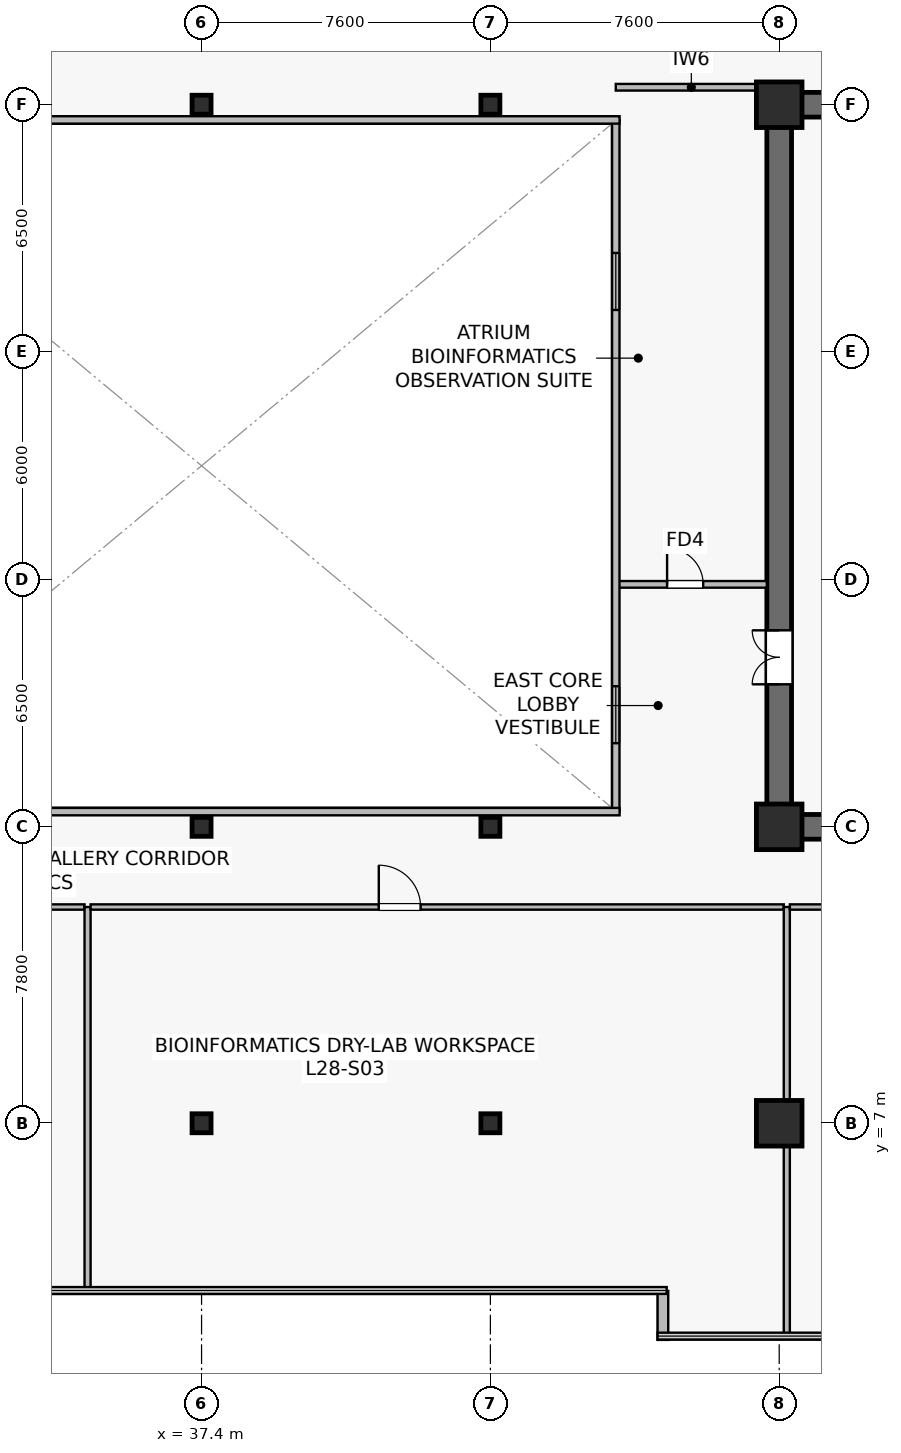
"""IFC4 building model, lengths in metres.
Left out: names, types, materials, properties, quantities, classifications, styles, units other than length and angle.
Written with IfcOpenShell. Run it as: python <this file> out.ifc"""

import sys

from ifc_helpers import new_model, si_unit, direction, frame, frame_2d, origin, origin_2d, place, context, subcontext, project, spatial, rectangle, hollow_rectangle, extrude, source, transform, mapped, element, fill, save


model = new_model("IFC4")
c1 = context("Model", 3, precision=1e-05, world=origin(), true_north=direction((0.0, 1.0)))
c2 = subcontext(c1, "Body", "Model", "MODEL_VIEW")
j1 = project(units=[si_unit("LENGTHUNIT", "METRE"), si_unit("PLANEANGLEUNIT", "RADIAN")], contexts=[c1])
p1 = place(None, origin())
s1 = spatial("IfcSite", under=j1, at=p1, CompositionType="ELEMENT")
p2 = place(p1, origin())
s2 = spatial("IfcBuilding", under=s1, at=p2, CompositionType="ELEMENT")
p3 = place(p2, frame((0.0, 0.0, 117.4)))
s3 = spatial("IfcBuildingStorey", under=s2, at=p3, CompositionType="ELEMENT", Elevation=117.4)
p4 = place(p3, frame((52.275, 14.8, 0.0), z_axis=(0.0, 0.0, 1.0), x_axis=(1.0, 0.0, 0.0)))
e1 = element("IfcWall", 1, at=p4, inside=s3, PredefinedType="SHEAR", context=c2, shape_type="SweptSolid", body=[
    extrude(rectangle(XDim=15.45, YDim=0.65, at=frame_2d((7.725, 0.0))), origin(), (0.0, 0.0, 1.0), 3.79),
])
p5 = place(p3, frame((52.275, 33.8, 0.0), z_axis=(0.0, 0.0, 1.0), x_axis=(1.0, 0.0, 0.0)))
e2 = element("IfcWall", 2, at=p5, inside=s3, PredefinedType="SHEAR", context=c2, shape_type="SweptSolid", body=[
    extrude(rectangle(XDim=15.45, YDim=0.65, at=frame_2d((7.725, 0.0))), origin(), (0.0, 0.0, 1.0), 3.79),
])
p6 = place(p5, frame((8.825, 0.0, 0.0)))
e3 = element("IfcOpeningElement", 3, at=p6, cuts=e2, PredefinedType="OPENING", context=c2, shape_type="SweptSolid", body=[
    extrude(rectangle(XDim=0.95, YDim=2.15, at=frame_2d((0.475, 1.075))), frame((0.0, 0.335, 0.0), z_axis=(0.0, -1.0, 0.0), x_axis=(1.0, 0.0, 0.0)), (0.0, 0.0, 1.0), 0.67),
])
p7 = place(p5, frame((5.46, 0.0, 0.0)))
e4 = element("IfcOpeningElement", 4, at=p7, cuts=e2, PredefinedType="OPENING", context=c2, shape_type="SweptSolid", body=[
    extrude(rectangle(XDim=0.95, YDim=2.15, at=frame_2d((0.475, 1.075))), frame((0.0, 0.335, 0.0), z_axis=(0.0, -1.0, 0.0), x_axis=(1.0, 0.0, 0.0)), (0.0, 0.0, 1.0), 0.67),
])
p8 = place(p5, frame((2.06, 0.0, 0.0)))
e5 = element("IfcOpeningElement", 5, at=p8, cuts=e2, PredefinedType="OPENING", context=c2, shape_type="SweptSolid", body=[
    extrude(rectangle(XDim=0.95, YDim=2.15, at=frame_2d((0.475, 1.075))), frame((0.0, 0.335, 0.0), z_axis=(0.0, -1.0, 0.0), x_axis=(1.0, 0.0, 0.0)), (0.0, 0.0, 1.0), 0.67),
])
p9 = place(p3, frame((52.6, 15.125, 0.0), z_axis=(0.0, 0.0, 1.0), x_axis=(0.0, 1.0, 0.0)))
e6 = element("IfcWall", 6, at=p9, inside=s3, PredefinedType="SHEAR", context=c2, shape_type="SweptSolid", body=[
    extrude(rectangle(XDim=18.35, YDim=0.65, at=frame_2d((9.175, 0.0))), origin(), (0.0, 0.0, 1.0), 3.79),
])
p10 = place(p9, frame((3.425, 0.0, 0.0)))
e7 = element("IfcOpeningElement", 7, at=p10, cuts=e6, PredefinedType="OPENING", context=c2, shape_type="SweptSolid", body=[
    extrude(rectangle(XDim=1.42, YDim=2.2, at=frame_2d((0.71, 1.1))), frame((0.0, 0.335, 0.0), z_axis=(0.0, -1.0, 0.0), x_axis=(1.0, 0.0, 0.0)), (0.0, 0.0, 1.0), 0.67),
])
m1 = source(origin(), c2, "Body", "SweptSolid", [
    extrude(rectangle(XDim=1.2, YDim=1.2, at=origin_2d()), origin(), (0.0, 0.0, 1.0), 4.1),
])
for number, where, z_axis, x_axis in (
    (8, (52.6, 7.0, 0.0), (0.0, 0.0, 1.0), (1.0, 0.0, 0.0)),
    (9, (52.6, 14.8, 0.0), (0.0, 0.0, 1.0), (1.0, 0.0, 0.0)),
    (10, (52.6, 33.8, 0.0), (0.0, 0.0, 1.0), (1.0, 0.0, 0.0)),
):
    element("IfcColumn", number, at=place(p3, frame(where, z_axis=z_axis, x_axis=x_axis)), inside=s3, PredefinedType="COLUMN", context=c2, shape_type="MappedRepresentation", body=[
        mapped(m1, transform((0.0, 0.0, 0.0), scale=1.0)),
    ])
m2 = source(origin(), c2, "Body", "SweptSolid", [
    extrude(hollow_rectangle(XDim=0.5, YDim=0.5, WallThickness=0.022, at=origin_2d()), origin(), (0.0, 0.0, 1.0), 4.1),
])
for number, where, z_axis, x_axis in (
    (11, (37.4, 7.0, 0.0), (0.0, 0.0, 1.0), (1.0, 0.0, 0.0)),
    (12, (37.4, 14.8, 0.0), (0.0, 0.0, 1.0), (1.0, 0.0, 0.0)),
    (13, (37.4, 33.8, 0.0), (0.0, 0.0, 1.0), (1.0, 0.0, 0.0)),
    (14, (45.0, 7.0, 0.0), (0.0, 0.0, 1.0), (1.0, 0.0, 0.0)),
    (15, (45.0, 14.8, 0.0), (0.0, 0.0, 1.0), (1.0, 0.0, 0.0)),
    (16, (45.0, 33.8, 0.0), (0.0, 0.0, 1.0), (1.0, 0.0, 0.0)),
):
    element("IfcColumn", number, at=place(p3, frame(where, z_axis=z_axis, x_axis=x_axis)), inside=s3, PredefinedType="COLUMN", context=c2, shape_type="MappedRepresentation", body=[
        mapped(m2, transform((0.0, 0.0, 0.0), scale=1.0)),
    ])
p11 = place(p3, frame((49.54, 2.588, 0.0), z_axis=(0.0, 0.0, 1.0), x_axis=(0.0, -1.0, 0.0)))
e17 = element("IfcWall", 17, at=p11, inside=s3, PredefinedType="STANDARD", context=c2, shape_type="SweptSolid", body=[
    extrude(rectangle(XDim=1.288, YDim=0.28, at=frame_2d((0.644, 0.0))), origin(), (0.0, 0.0, 1.0), 3.79),
])
p12 = place(p3, frame((48.3, 34.26, 0.0), z_axis=(0.0, 0.0, 1.0), x_axis=(1.0, 0.0, 0.0)))
e18 = element("IfcWall", 18, at=p12, inside=s3, PredefinedType="PARTITIONING", context=c2, shape_type="SweptSolid", body=[
    extrude(rectangle(XDim=3.975, YDim=0.175, at=frame_2d((1.987, 0.0))), origin(), (0.0, 0.0, 1.0), 3.475),
])
p13 = place(p3, frame((48.3, 21.18, 0.0), z_axis=(0.0, 0.0, 1.0), x_axis=(1.0, 0.0, 0.0)))
e19 = element("IfcWall", 19, at=p13, inside=s3, PredefinedType="PARTITIONING", context=c2, shape_type="SweptSolid", body=[
    extrude(rectangle(XDim=3.975, YDim=0.175, at=frame_2d((1.987, 0.0))), origin(), (0.0, 0.0, 1.0), 3.79),
])
p14 = place(p13, frame((1.35, 0.0, 0.0)))
e20 = element("IfcOpeningElement", 20, at=p14, cuts=e19, PredefinedType="OPENING", context=c2, shape_type="SweptSolid", body=[
    extrude(rectangle(XDim=0.95, YDim=2.15, at=frame_2d((0.475, 1.075))), frame((0.0, 0.098, 0.0), z_axis=(0.0, -1.0, 0.0), x_axis=(1.0, 0.0, 0.0)), (0.0, 0.0, 1.0), 0.195),
])
p15 = place(p3, frame((48.3, 15.2, 0.0), z_axis=(0.0, 0.0, 1.0), x_axis=(0.0, 1.0, 0.0)))
e21 = element("IfcWall", 21, at=p15, inside=s3, PredefinedType="SOLIDWALL", context=c2, shape_type="SweptSolid", body=[
    extrude(rectangle(XDim=18.2, YDim=0.195, at=frame_2d((9.1, 0.0))), origin(), (0.0, 0.0, 1.0), 3.79),
])
p16 = place(p15, frame((1.8, 0.0, 0.9)))
e22 = element("IfcOpeningElement", 22, at=p16, cuts=e21, PredefinedType="OPENING", context=c2, shape_type="SweptSolid", body=[
    extrude(rectangle(XDim=1.5, YDim=1.4, at=frame_2d((0.75, 0.7))), frame((0.0, 0.107, 0.0), z_axis=(0.0, -1.0, 0.0), x_axis=(1.0, 0.0, 0.0)), (0.0, 0.0, 1.0), 0.215),
])
p17 = place(p15, frame((13.2, 0.0, 0.9)))
e23 = element("IfcOpeningElement", 23, at=p17, cuts=e21, PredefinedType="OPENING", context=c2, shape_type="SweptSolid", body=[
    extrude(rectangle(XDim=1.5, YDim=1.4, at=frame_2d((0.75, 0.7))), frame((0.0, 0.107, 0.0), z_axis=(0.0, -1.0, 0.0), x_axis=(1.0, 0.0, 0.0)), (0.0, 0.0, 1.0), 0.215),
])
for number, where, z_axis, x_axis in (
    (24, (26.4, 15.2, 0.0), (0.0, 0.0, 1.0), (1.0, 0.0, 0.0)),
    (25, (26.4, 33.4, 0.0), (0.0, 0.0, 1.0), (1.0, 0.0, 0.0)),
):
    element("IfcWall", number, at=place(p3, frame(where, z_axis=z_axis, x_axis=x_axis)), inside=s3, PredefinedType="SOLIDWALL", context=c2, shape_type="SweptSolid", body=[
        extrude(rectangle(XDim=22.0, YDim=0.195, at=frame_2d((11.0, 0.0))), origin(), (0.0, 0.0, 1.0), 3.79),
    ])
p18 = place(p3, frame((16.08, 12.69, 0.0), z_axis=(0.0, 0.0, 1.0), x_axis=(1.0, 0.0, 0.0)))
e26 = element("IfcWall", 26, at=p18, inside=s3, PredefinedType="PARTITIONING", context=c2, shape_type="SweptSolid", body=[
    extrude(rectangle(XDim=18.24, YDim=0.14, at=frame_2d((9.12, 0.0))), origin(), (0.0, 0.0, 1.0), 3.125),
])
p19 = place(p18, frame((9.556, 0.0, 0.0)))
e27 = element("IfcOpeningElement", 27, at=p19, cuts=e26, PredefinedType="OPENING", context=c2, shape_type="SweptSolid", body=[
    extrude(rectangle(XDim=1.1, YDim=2.18, at=frame_2d((0.55, 1.09))), frame((0.0, 0.08, 0.0), z_axis=(0.0, -1.0, 0.0), x_axis=(1.0, 0.0, 0.0)), (0.0, 0.0, 1.0), 0.16),
])
p20 = place(p3, frame((34.4, 2.61, 0.0), z_axis=(0.0, 0.0, 1.0), x_axis=(0.0, 1.0, 0.0)))
e28 = element("IfcWall", 28, at=p20, inside=s3, PredefinedType="PARTITIONING", context=c2, shape_type="SweptSolid", body=[
    extrude(rectangle(XDim=10.08, YDim=0.16, at=frame_2d((5.04, 0.0))), origin(), (0.0, 0.0, 1.0), 3.075),
])
p21 = place(p3, frame((34.48, 12.69, 0.0), z_axis=(0.0, 0.0, 1.0), x_axis=(1.0, 0.0, 0.0)))
e29 = element("IfcWall", 29, at=p21, inside=s3, PredefinedType="PARTITIONING", context=c2, shape_type="SweptSolid", body=[
    extrude(rectangle(XDim=18.24, YDim=0.14, at=frame_2d((9.12, 0.0))), origin(), (0.0, 0.0, 1.0), 3.125),
])
p22 = place(p21, frame((7.583, 0.0, 0.0)))
e30 = element("IfcOpeningElement", 30, at=p22, cuts=e29, PredefinedType="OPENING", context=c2, shape_type="SweptSolid", body=[
    extrude(rectangle(XDim=1.1, YDim=2.18, at=frame_2d((0.55, 1.09))), frame((0.0, 0.08, 0.0), z_axis=(0.0, -1.0, 0.0), x_axis=(1.0, 0.0, 0.0)), (0.0, 0.0, 1.0), 0.16),
])
p23 = place(p3, frame((52.8, 1.41, 0.0), z_axis=(0.0, 0.0, 1.0), x_axis=(0.0, 1.0, 0.0)))
e31 = element("IfcWall", 31, at=p23, inside=s3, PredefinedType="PARTITIONING", context=c2, shape_type="SweptSolid", body=[
    extrude(rectangle(XDim=11.28, YDim=0.16, at=frame_2d((5.64, 0.0))), origin(), (0.0, 0.0, 1.0), 3.075),
])
p24 = place(p3, frame((52.88, 12.69, 0.0), z_axis=(0.0, 0.0, 1.0), x_axis=(1.0, 0.0, 0.0)))
e32 = element("IfcWall", 32, at=p24, inside=s3, PredefinedType="PARTITIONING", context=c2, shape_type="SweptSolid", body=[
    extrude(rectangle(XDim=14.94, YDim=0.14, at=frame_2d((7.47, 0.0))), origin(), (0.0, 0.0, 1.0), 3.125),
])
p25 = place(p24, frame((7.708, 0.0, 0.0)))
e33 = element("IfcOpeningElement", 33, at=p25, cuts=e32, PredefinedType="OPENING", context=c2, shape_type="SweptSolid", body=[
    extrude(rectangle(XDim=1.1, YDim=2.18, at=frame_2d((0.55, 1.09))), frame((0.0, 0.08, 0.0), z_axis=(0.0, -1.0, 0.0), x_axis=(1.0, 0.0, 0.0)), (0.0, 0.0, 1.0), 0.16),
])
m3 = source(origin(), c2, "Body", "SweptSolid", [
    extrude(rectangle(XDim=1.5, YDim=1.4, at=frame_2d((0.75, 0.7))), frame((0.0, 0.03, 0.0), z_axis=(0.0, -1.0, 0.0), x_axis=(1.0, 0.0, 0.0)), (0.0, 0.0, 1.0), 0.06),
])
p26 = place(p16, origin())
e34 = element("IfcWindow", 34, at=p26, inside=s3, PartitioningType="SINGLE_PANEL", PredefinedType="WINDOW", context=c2, shape_type="MappedRepresentation", body=[
    mapped(m3, transform((0.0, 0.0, 0.0), scale=1.0)),
])
fill(e22, e34)
p27 = place(p17, origin())
e35 = element("IfcWindow", 35, at=p27, inside=s3, PartitioningType="SINGLE_PANEL", PredefinedType="WINDOW", context=c2, shape_type="MappedRepresentation", body=[
    mapped(m3, transform((0.0, 0.0, 0.0), scale=1.0)),
])
fill(e23, e35)
m4 = source(origin(), c2, "Body", "SweptSolid", [
    extrude(rectangle(XDim=1.42, YDim=2.2, at=frame_2d((0.71, 1.1))), frame((0.0, 0.025, 0.0), z_axis=(0.0, -1.0, 0.0), x_axis=(1.0, 0.0, 0.0)), (0.0, 0.0, 1.0), 0.05),
])
p28 = place(p10, origin())
e36 = element("IfcDoor", 36, at=p28, inside=s3, OperationType="DOUBLE_DOOR_SINGLE_SWING", PredefinedType="DOOR", context=c2, shape_type="MappedRepresentation", body=[
    mapped(m4, transform((0.0, 0.0, 0.0), scale=1.0)),
])
fill(e7, e36)
m5 = source(origin(), c2, "Body", "SweptSolid", [
    extrude(rectangle(XDim=0.95, YDim=2.15, at=frame_2d((0.475, 1.075))), frame((0.0, 0.025, 0.0), z_axis=(0.0, -1.0, 0.0), x_axis=(1.0, 0.0, 0.0)), (0.0, 0.0, 1.0), 0.05),
])
p29 = place(p14, origin())
e37 = element("IfcDoor", 37, at=p29, inside=s3, OperationType="SINGLE_SWING_LEFT", PredefinedType="DOOR", context=c2, shape_type="MappedRepresentation", body=[
    mapped(m5, transform((0.0, 0.0, 0.0), scale=1.0)),
])
fill(e20, e37)
m6 = source(origin(), c2, "Body", "SweptSolid", [
    extrude(rectangle(XDim=1.1, YDim=2.18, at=frame_2d((0.55, 1.09))), frame((0.0, 0.025, 0.0), z_axis=(0.0, -1.0, 0.0), x_axis=(1.0, 0.0, 0.0)), (0.0, 0.0, 1.0), 0.05),
])
p30 = place(p22, origin())
e38 = element("IfcDoor", 38, at=p30, inside=s3, OperationType="SINGLE_SWING_LEFT", PredefinedType="DOOR", context=c2, shape_type="MappedRepresentation", body=[
    mapped(m6, transform((0.0, 0.0, 0.0), scale=1.0)),
])
fill(e30, e38)
save(model, sys.argv[1])
